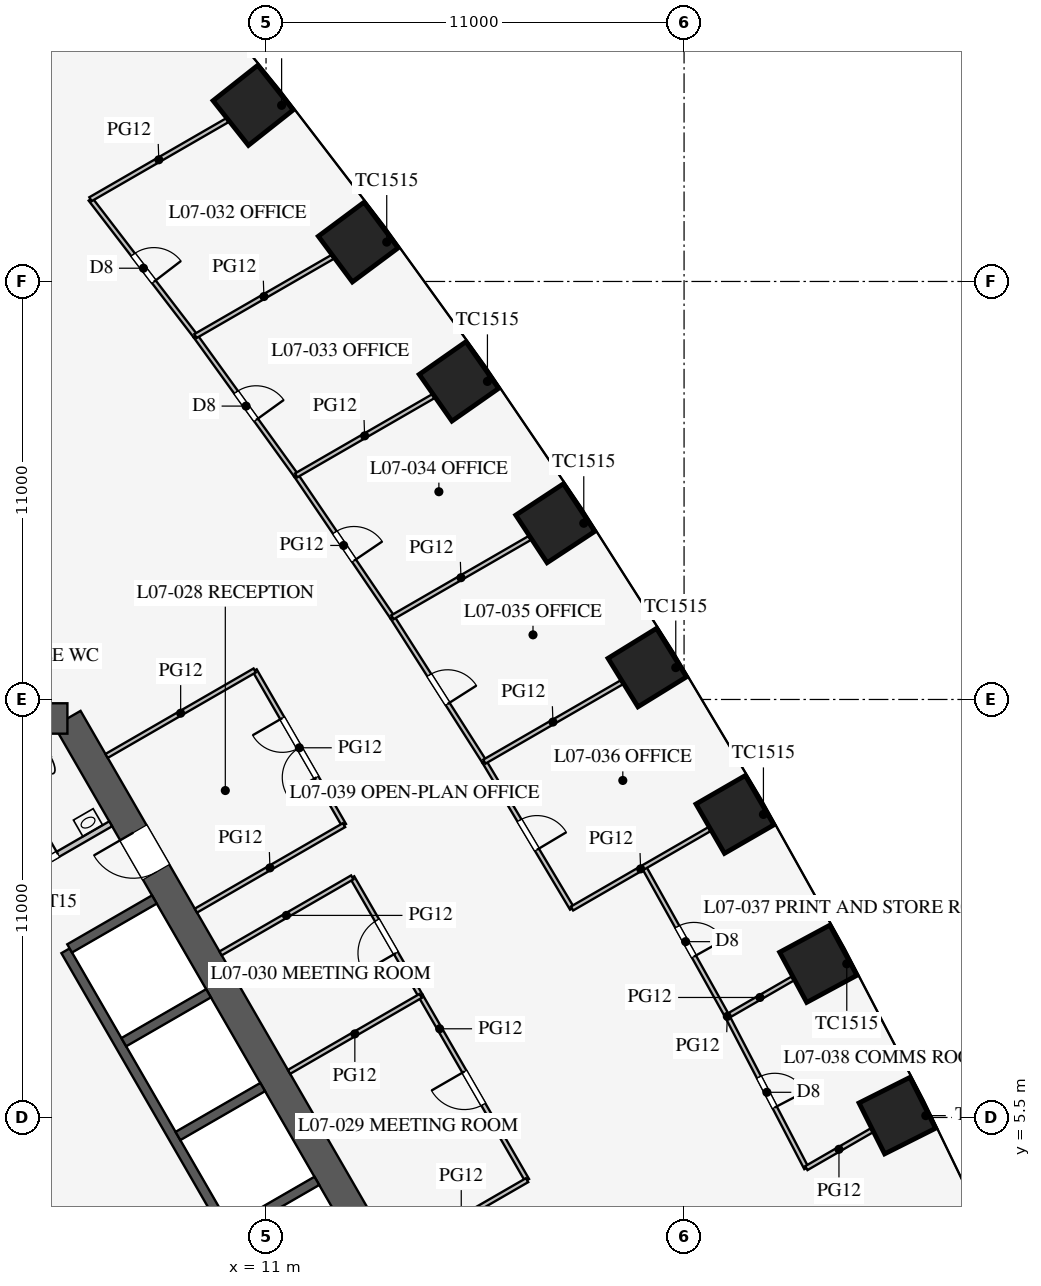
"""IFC4 building model, lengths in metres.
Left out: names, types, materials, properties, quantities, classifications, styles, units other than length and angle.
Written with IfcOpenShell. Run it as: python <this file> out.ifc"""

import sys

from ifc_helpers import new_model, si_unit, direction, frame, frame_2d, origin, origin_2d, place, context, subcontext, project, spatial, rectangle, extrude, element, fill, save


model = new_model("IFC4")
c1 = context("Model", 3, precision=1e-05, world=origin(), true_north=direction((0.0, 1.0)))
c2 = subcontext(c1, "Body", "Model", "MODEL_VIEW")
j1 = project(units=[si_unit("LENGTHUNIT", "METRE"), si_unit("PLANEANGLEUNIT", "RADIAN")], contexts=[c1])
p1 = place(None, origin())
s1 = spatial("IfcSite", under=j1, at=p1, CompositionType="ELEMENT")
p2 = place(p1, origin())
s2 = spatial("IfcBuilding", under=s1, at=p2, CompositionType="ELEMENT")
p3 = place(p2, frame((0.0, 0.0, 33.3)))
s3 = spatial("IfcBuildingStorey", under=s2, at=p3, CompositionType="ELEMENT", Elevation=33.3)
for number, where, z_axis, x_axis in (
    (1, (27.611, 5.549, 0.0), (0.0, 0.0, 1.0), (-0.449, 0.894, 0.0)),
    (2, (25.531, 9.544, 0.0), (0.0, 0.0, 1.0), (-0.475, 0.88, 0.0)),
    (3, (23.338, 13.474, 0.0), (0.0, 0.0, 1.0), (-0.5, 0.866, 0.0)),
    (4, (21.031, 17.339, 0.0), (0.0, 0.0, 1.0), (-0.525, 0.851, 0.0)),
    (5, (18.611, 21.137, 0.0), (0.0, 0.0, 1.0), (-0.549, 0.836, 0.0)),
    (6, (16.076, 24.87, 0.0), (0.0, 0.0, 1.0), (-0.574, 0.819, 0.0)),
    (7, (13.426, 28.536, 0.0), (0.0, 0.0, 1.0), (-0.597, 0.802, 0.0)),
    (8, (10.66, 32.135, 0.0), (0.0, 0.0, 1.0), (-0.62, 0.784, 0.0)),
):
    element("IfcColumn", number, at=place(p3, frame(where, z_axis=z_axis, x_axis=x_axis)), inside=s3, PredefinedType="COLUMN", context=c2, shape_type="SweptSolid", body=[
        extrude(rectangle(XDim=1.5, YDim=1.5, at=origin_2d()), origin(), (0.0, 0.0, 1.0), 4.2),
    ])
p4 = place(p3, frame((16.743, -3.0, 0.0), z_axis=(0.0, 0.0, 1.0), x_axis=(-0.500002442456, 0.866023993627, 0.0)))
e9 = element("IfcWall", 9, at=p4, inside=s3, PredefinedType="SHEAR", context=c2, shape_type="SweptSolid", body=[
    extrude(rectangle(XDim=21.939, YDim=0.8, at=frame_2d((10.97, 0.0))), origin(), (0.0, 0.0, 1.0), 4.2),
])
p5 = place(p4, frame((17.27, 0.0, 0.0)))
e10 = element("IfcOpeningElement", 10, at=p5, cuts=e9, PredefinedType="OPENING", context=c2, shape_type="SweptSolid", body=[
    extrude(rectangle(XDim=1.2, YDim=2.1, at=frame_2d((0.6, 1.05))), frame((0.0, 0.41, 0.0), z_axis=(0.0, -1.0, 0.0), x_axis=(1.0, 0.0, 0.0)), (0.0, 0.0, 1.0), 0.82),
])
p6 = place(p4, frame((3.47, 0.0, 0.0)))
e11 = element("IfcOpeningElement", 11, at=p6, cuts=e9, PredefinedType="OPENING", context=c2, shape_type="SweptSolid", body=[
    extrude(rectangle(XDim=1.2, YDim=2.1, at=frame_2d((0.6, 1.05))), frame((0.0, 0.41, 0.0), z_axis=(0.0, -1.0, 0.0), x_axis=(1.0, 0.0, 0.0)), (0.0, 0.0, 1.0), 0.82),
])
p7 = place(p3, frame((5.773, 16.0, 0.0), z_axis=(0.0, 0.0, 1.0), x_axis=(-1.0, 0.0, 0.0)))
e12 = element("IfcWall", 12, at=p7, inside=s3, PredefinedType="SHEAR", context=c2, shape_type="SweptSolid", body=[
    extrude(rectangle(XDim=11.547, YDim=0.8, at=frame_2d((5.773, 0.0))), origin(), (0.0, 0.0, 1.0), 4.2),
])
p8 = place(p3, frame((11.424, 0.014, 0.0), z_axis=(0.0, 0.0, 1.0), x_axis=(-0.500001763848, 0.866024385424, 0.0)))
e13 = element("IfcWall", 13, at=p8, inside=s3, PredefinedType="SHEAR", context=c2, shape_type="SweptSolid", body=[
    extrude(rectangle(XDim=11.4, YDim=0.25, at=frame_2d((5.7, 0.0))), origin(), (0.0, 0.0, 1.0), 4.2),
])
for number, where, z_axis, x_axis in (
    (14, (10.107, 2.544, 0.0), (0.0, 0.0, 1.0), (0.866, 0.5, 0.0)),
    (15, (8.682, 5.012, 0.0), (0.0, 0.0, 1.0), (0.866, 0.5, 0.0)),
    (16, (7.257, 7.481, 0.0), (0.0, 0.0, 1.0), (0.866, 0.5, 0.0)),
):
    element("IfcWall", number, at=place(p3, frame(where, z_axis=z_axis, x_axis=x_axis)), inside=s3, PredefinedType="SHEAR", context=c2, shape_type="SweptSolid", body=[
        extrude(rectangle(XDim=2.575, YDim=0.25, at=frame_2d((1.288, 0.0))), origin(), (0.0, 0.0, 1.0), 4.2),
    ])
p9 = place(p3, frame((5.832, 9.949, 0.0), z_axis=(0.0, 0.0, 1.0), x_axis=(0.866029291668, 0.499993265928, 0.0)))
e17 = element("IfcWall", 17, at=p9, inside=s3, PredefinedType="SHEAR", context=c2, shape_type="SweptSolid", body=[
    extrude(rectangle(XDim=2.575, YDim=0.25, at=frame_2d((1.288, 0.0))), origin(), (0.0, 0.0, 1.0), 4.2),
])
p10 = place(p3, frame((2.495, 10.678, 0.0), z_axis=(0.0, 0.0, 1.0), x_axis=(0.86602216432, 0.500005610874, 0.0)))
e18 = element("IfcWall", 18, at=p10, inside=s3, PredefinedType="PARTITIONING", context=c2, shape_type="SweptSolid", body=[
    extrude(rectangle(XDim=5.1, YDim=0.15, at=frame_2d((2.55, 0.0))), origin(), (0.0, 0.0, 1.0), 4.0),
])
p11 = place(p10, frame((2.6, 0.0, 0.0)))
e19 = element("IfcOpeningElement", 19, at=p11, cuts=e18, PredefinedType="OPENING", context=c2, shape_type="SweptSolid", body=[
    extrude(rectangle(XDim=0.9, YDim=2.1, at=frame_2d((0.45, 1.05))), frame((0.0, 0.085, 0.0), z_axis=(0.0, -1.0, 0.0), x_axis=(1.0, 0.0, 0.0)), (0.0, 0.0, 1.0), 0.17),
])
p12 = place(p3, frame((13.052, 13.194, 0.0), z_axis=(0.0, 0.0, 1.0), x_axis=(-0.499977259774, 0.866038532462, 0.0)))
e20 = element("IfcWall", 20, at=p12, inside=s3, PredefinedType="PARTITIONING", context=c2, shape_type="SweptSolid", body=[
    extrude(rectangle(XDim=4.7, YDim=0.12, at=frame_2d((2.35, 0.0))), origin(), (0.0, 0.0, 1.0), 2.9),
])
p13 = place(p12, frame((1.45, 0.0, 0.15)))
e21 = element("IfcOpeningElement", 21, at=p13, cuts=e20, PredefinedType="OPENING", context=c2, shape_type="SweptSolid", body=[
    extrude(rectangle(XDim=1.8, YDim=2.1, at=frame_2d((0.9, 1.05))), frame((0.0, 0.07, 0.0), z_axis=(0.0, -1.0, 0.0), x_axis=(1.0, 0.0, 0.0)), (0.0, 0.0, 1.0), 0.14),
])
p14 = place(p3, frame((15.069, 8.7, 0.0), z_axis=(0.0, 0.0, 1.0), x_axis=(-0.500012057535, 0.866018442252, 0.0)))
e22 = element("IfcWall", 22, at=p14, inside=s3, PredefinedType="PARTITIONING", context=c2, shape_type="SweptSolid", body=[
    extrude(rectangle(XDim=3.6, YDim=0.12, at=frame_2d((1.8, 0.0))), origin(), (0.0, 0.0, 1.0), 2.9),
])
p15 = place(p14, frame((1.3, 0.0, 0.15)))
e23 = element("IfcOpeningElement", 23, at=p15, cuts=e22, PredefinedType="OPENING", context=c2, shape_type="SweptSolid", body=[
    extrude(rectangle(XDim=1.0, YDim=2.1, at=frame_2d((0.5, 1.05))), frame((0.0, 0.07, 0.0), z_axis=(0.0, -1.0, 0.0), x_axis=(1.0, 0.0, 0.0)), (0.0, 0.0, 1.0), 0.14),
])
p16 = place(p3, frame((17.869, 3.85, 0.0), z_axis=(0.0, 0.0, 1.0), x_axis=(-0.500016814911, 0.866015695474, 0.0)))
e24 = element("IfcWall", 24, at=p16, inside=s3, PredefinedType="PARTITIONING", context=c2, shape_type="SweptSolid", body=[
    extrude(rectangle(XDim=5.6, YDim=0.12, at=frame_2d((2.8, 0.0))), origin(), (0.0, 0.0, 1.0), 2.9),
])
p17 = place(p16, frame((2.3, 0.0, 0.15)))
e25 = element("IfcOpeningElement", 25, at=p17, cuts=e24, PredefinedType="OPENING", context=c2, shape_type="SweptSolid", body=[
    extrude(rectangle(XDim=1.0, YDim=2.1, at=frame_2d((0.5, 1.05))), frame((0.0, 0.07, 0.0), z_axis=(0.0, -1.0, 0.0), x_axis=(1.0, 0.0, 0.0)), (0.0, 0.0, 1.0), 0.14),
])
p18 = place(p3, frame((9.805, 9.818, 0.0), z_axis=(0.0, 0.0, 1.0), x_axis=(0.866026010844, 0.49999894854, 0.0)))
e26 = element("IfcWall", 26, at=p18, inside=s3, PredefinedType="PARTITIONING", context=c2, shape_type="SweptSolid", body=[
    extrude(rectangle(XDim=4.0, YDim=0.12, at=frame_2d((2.0, 0.0))), origin(), (0.0, 0.0, 1.0), 2.9),
])
p19 = place(p3, frame((9.155, 10.944, 0.0), z_axis=(0.0, 0.0, 1.0), x_axis=(0.866017533419, 0.500013631625, 0.0)))
e27 = element("IfcWall", 27, at=p19, inside=s3, PredefinedType="PARTITIONING", context=c2, shape_type="SweptSolid", body=[
    extrude(rectangle(XDim=4.5, YDim=0.12, at=frame_2d((2.25, 0.0))), origin(), (0.0, 0.0, 1.0), 2.9),
])
p20 = place(p3, frame((6.805, 15.014, 0.0), z_axis=(0.0, 0.0, 1.0), x_axis=(0.866031096941, 0.499990139034, 0.0)))
e28 = element("IfcWall", 28, at=p20, inside=s3, PredefinedType="PARTITIONING", context=c2, shape_type="SweptSolid", body=[
    extrude(rectangle(XDim=4.5, YDim=0.12, at=frame_2d((2.25, 0.0))), origin(), (0.0, 0.0, 1.0), 2.9),
])
for number, where, z_axis, x_axis in (
    (29, (11.605, 6.7, 0.0), (0.0, 0.0, 1.0), (0.866, 0.5, 0.0)),
    (30, (14.405, 1.85, 0.0), (0.0, 0.0, 1.0), (0.866, 0.5, 0.0)),
):
    element("IfcWall", number, at=place(p3, frame(where, z_axis=z_axis, x_axis=x_axis)), inside=s3, PredefinedType="PARTITIONING", context=c2, shape_type="SweptSolid", body=[
        extrude(rectangle(XDim=4.0, YDim=0.12, at=frame_2d((2.0, 0.0))), origin(), (0.0, 0.0, 1.0), 2.9),
    ])
p21 = place(p3, frame((19.052, 10.999, 0.0), z_axis=(0.0, 0.0, 1.0), x_axis=(-0.51252396108, 0.858672923364, 0.0)))
e31 = element("IfcWall", 31, at=p21, inside=s3, PredefinedType="PARTITIONING", context=c2, shape_type="SweptSolid", body=[
    extrude(rectangle(XDim=4.5, YDim=0.12, at=frame_2d((2.25, 0.0))), origin(), (0.0, 0.0, 1.0), 2.9),
])
p22 = place(p21, frame((1.8, 0.0, 0.15)))
e32 = element("IfcOpeningElement", 32, at=p22, cuts=e31, PredefinedType="OPENING", context=c2, shape_type="SweptSolid", body=[
    extrude(rectangle(XDim=0.9, YDim=2.1, at=frame_2d((0.45, 1.05))), frame((0.0, 0.07, 0.0), z_axis=(0.0, -1.0, 0.0), x_axis=(1.0, 0.0, 0.0)), (0.0, 0.0, 1.0), 0.14),
])
p23 = place(p3, frame((11.792, 22.396, 0.0), z_axis=(0.0, 0.0, 1.0), x_axis=(-0.585376255171, 0.810761765183, 0.0)))
e33 = element("IfcWall", 33, at=p23, inside=s3, PredefinedType="PARTITIONING", context=c2, shape_type="SweptSolid", body=[
    extrude(rectangle(XDim=4.523, YDim=0.12, at=frame_2d((2.262, 0.0))), origin(), (0.0, 0.0, 1.0), 2.9),
])
p24 = place(p23, frame((1.8, 0.0, 0.15)))
e34 = element("IfcOpeningElement", 34, at=p24, cuts=e33, PredefinedType="OPENING", context=c2, shape_type="SweptSolid", body=[
    extrude(rectangle(XDim=0.9, YDim=2.1, at=frame_2d((0.45, 1.05))), frame((0.0, 0.07, 0.0), z_axis=(0.0, -1.0, 0.0), x_axis=(1.0, 0.0, 0.0)), (0.0, 0.0, 1.0), 0.14),
])
p25 = place(p3, frame((9.144, 26.064, 0.0), z_axis=(0.0, 0.0, 1.0), x_axis=(-0.608818785139, 0.79330932609, 0.0)))
e35 = element("IfcWall", 35, at=p25, inside=s3, PredefinedType="PARTITIONING", context=c2, shape_type="SweptSolid", body=[
    extrude(rectangle(XDim=4.539, YDim=0.12, at=frame_2d((2.27, 0.0))), origin(), (0.0, 0.0, 1.0), 2.9),
])
p26 = place(p25, frame((1.8, 0.0, 0.15)))
e36 = element("IfcOpeningElement", 36, at=p26, cuts=e35, PredefinedType="OPENING", context=c2, shape_type="SweptSolid", body=[
    extrude(rectangle(XDim=0.9, YDim=2.1, at=frame_2d((0.45, 1.05))), frame((0.0, 0.07, 0.0), z_axis=(0.0, -1.0, 0.0), x_axis=(1.0, 0.0, 0.0)), (0.0, 0.0, 1.0), 0.14),
])
p27 = place(p3, frame((16.745, 14.864, 0.0), z_axis=(0.0, 0.0, 1.0), x_axis=(-0.537205132487, 0.843451626135, 0.0)))
e37 = element("IfcWall", 37, at=p27, inside=s3, PredefinedType="PARTITIONING", context=c2, shape_type="SweptSolid", body=[
    extrude(rectangle(XDim=4.504, YDim=0.12, at=frame_2d((2.252, 0.0))), origin(), (0.0, 0.0, 1.0), 2.9),
])
p28 = place(p27, frame((1.8, 0.0, 0.15)))
e38 = element("IfcOpeningElement", 38, at=p28, cuts=e37, PredefinedType="OPENING", context=c2, shape_type="SweptSolid", body=[
    extrude(rectangle(XDim=0.9, YDim=2.1, at=frame_2d((0.45, 1.05))), frame((0.0, 0.07, 0.0), z_axis=(0.0, -1.0, 0.0), x_axis=(1.0, 0.0, 0.0)), (0.0, 0.0, 1.0), 0.14),
])
p29 = place(p3, frame((14.325, 18.663, 0.0), z_axis=(0.0, 0.0, 1.0), x_axis=(-0.561512004239, 0.827468591002, 0.0)))
e39 = element("IfcWall", 39, at=p29, inside=s3, PredefinedType="PARTITIONING", context=c2, shape_type="SweptSolid", body=[
    extrude(rectangle(XDim=4.512, YDim=0.12, at=frame_2d((2.256, 0.0))), origin(), (0.0, 0.0, 1.0), 2.9),
])
p30 = place(p29, frame((1.8, 0.0, 0.15)))
e40 = element("IfcOpeningElement", 40, at=p30, cuts=e39, PredefinedType="OPENING", context=c2, shape_type="SweptSolid", body=[
    extrude(rectangle(XDim=0.9, YDim=2.1, at=frame_2d((0.45, 1.05))), frame((0.0, 0.07, 0.0), z_axis=(0.0, -1.0, 0.0), x_axis=(1.0, 0.0, 0.0)), (0.0, 0.0, 1.0), 0.14),
])
p31 = place(p3, frame((23.137, 8.162, 0.0), z_axis=(0.0, 0.0, 1.0), x_axis=(-0.487415216275, 0.87317031955, 0.0)))
e41 = element("IfcWall", 41, at=p31, inside=s3, PredefinedType="PARTITIONING", context=c2, shape_type="SweptSolid", body=[
    extrude(rectangle(XDim=4.5, YDim=0.12, at=frame_2d((2.25, 0.0))), origin(), (0.0, 0.0, 1.0), 2.9),
])
p32 = place(p31, frame((1.8, 0.0, 0.15)))
e42 = element("IfcOpeningElement", 42, at=p32, cuts=e41, PredefinedType="OPENING", context=c2, shape_type="SweptSolid", body=[
    extrude(rectangle(XDim=0.9, YDim=2.1, at=frame_2d((0.45, 1.05))), frame((0.0, 0.07, 0.0), z_axis=(0.0, -1.0, 0.0), x_axis=(1.0, 0.0, 0.0)), (0.0, 0.0, 1.0), 0.14),
])
p33 = place(p3, frame((25.217, 4.167, 0.0), z_axis=(0.0, 0.0, 1.0), x_axis=(-0.461810056307, 0.886978845235, 0.0)))
e43 = element("IfcWall", 43, at=p33, inside=s3, PredefinedType="PARTITIONING", context=c2, shape_type="SweptSolid", body=[
    extrude(rectangle(XDim=4.504, YDim=0.12, at=frame_2d((2.252, 0.0))), origin(), (0.0, 0.0, 1.0), 2.9),
])
p34 = place(p33, frame((1.8, 0.0, 0.15)))
e44 = element("IfcOpeningElement", 44, at=p34, cuts=e43, PredefinedType="OPENING", context=c2, shape_type="SweptSolid", body=[
    extrude(rectangle(XDim=0.9, YDim=2.1, at=frame_2d((0.45, 1.05))), frame((0.0, 0.07, 0.0), z_axis=(0.0, -1.0, 0.0), x_axis=(1.0, 0.0, 0.0)), (0.0, 0.0, 1.0), 0.14),
])
p35 = place(p3, frame((19.052, 10.999, 0.0), z_axis=(0.0, 0.0, 1.0), x_axis=(0.866004239599, 0.500036655653, 0.0)))
e45 = element("IfcWall", 45, at=p35, inside=s3, PredefinedType="PARTITIONING", context=c2, shape_type="SweptSolid", body=[
    extrude(rectangle(XDim=4.17, YDim=0.12, at=frame_2d((2.085, 0.0))), origin(), (0.0, 0.0, 1.0), 2.9),
])
p36 = place(p3, frame((11.792, 22.396, 0.0), z_axis=(0.0, 0.0, 1.0), x_axis=(0.866011781705, 0.500023593391, 0.0)))
e46 = element("IfcWall", 46, at=p36, inside=s3, PredefinedType="PARTITIONING", context=c2, shape_type="SweptSolid", body=[
    extrude(rectangle(XDim=4.164, YDim=0.12, at=frame_2d((2.082, 0.0))), origin(), (0.0, 0.0, 1.0), 2.9),
])
p37 = place(p3, frame((9.144, 26.064, 0.0), z_axis=(0.0, 0.0, 1.0), x_axis=(0.866031144707, 0.499990056298, 0.0)))
e47 = element("IfcWall", 47, at=p37, inside=s3, PredefinedType="PARTITIONING", context=c2, shape_type="SweptSolid", body=[
    extrude(rectangle(XDim=4.159, YDim=0.12, at=frame_2d((2.08, 0.0))), origin(), (0.0, 0.0, 1.0), 2.9),
])
p38 = place(p3, frame((6.38, 29.665, 0.0), z_axis=(0.0, 0.0, 1.0), x_axis=(0.866027987673, 0.499995524547, 0.0)))
e48 = element("IfcWall", 48, at=p38, inside=s3, PredefinedType="PARTITIONING", context=c2, shape_type="SweptSolid", body=[
    extrude(rectangle(XDim=4.153, YDim=0.12, at=frame_2d((2.077, 0.0))), origin(), (0.0, 0.0, 1.0), 2.9),
])
p39 = place(p3, frame((16.745, 14.864, 0.0), z_axis=(0.0, 0.0, 1.0), x_axis=(0.866025669538, 0.499999539701, 0.0)))
e49 = element("IfcWall", 49, at=p39, inside=s3, PredefinedType="PARTITIONING", context=c2, shape_type="SweptSolid", body=[
    extrude(rectangle(XDim=4.169, YDim=0.12, at=frame_2d((2.085, 0.0))), origin(), (0.0, 0.0, 1.0), 2.9),
])
p40 = place(p3, frame((14.325, 18.663, 0.0), z_axis=(0.0, 0.0, 1.0), x_axis=(0.866009971343, 0.50002672882, 0.0)))
e50 = element("IfcWall", 50, at=p40, inside=s3, PredefinedType="PARTITIONING", context=c2, shape_type="SweptSolid", body=[
    extrude(rectangle(XDim=4.167, YDim=0.12, at=frame_2d((2.083, 0.0))), origin(), (0.0, 0.0, 1.0), 2.9),
])
p41 = place(p3, frame((23.137, 8.162, 0.0), z_axis=(0.0, 0.0, 1.0), x_axis=(0.866023728021, 0.500002902497, 0.0)))
e51 = element("IfcWall", 51, at=p41, inside=s3, PredefinedType="PARTITIONING", context=c2, shape_type="SweptSolid", body=[
    extrude(rectangle(XDim=1.984, YDim=0.12, at=frame_2d((0.992, 0.0))), origin(), (0.0, 0.0, 1.0), 2.9),
])
p42 = place(p3, frame((25.217, 4.167, 0.0), z_axis=(0.0, 0.0, 1.0), x_axis=(0.866021515814, 0.500006734102, 0.0)))
e52 = element("IfcWall", 52, at=p42, inside=s3, PredefinedType="PARTITIONING", context=c2, shape_type="SweptSolid", body=[
    extrude(rectangle(XDim=1.982, YDim=0.12, at=frame_2d((0.991, 0.0))), origin(), (0.0, 0.0, 1.0), 2.9),
])
p43 = place(p11, origin())
e53 = element("IfcDoor", 53, at=p43, inside=s3, OperationType="SINGLE_SWING_RIGHT", PredefinedType="DOOR", context=c2, shape_type="SweptSolid", body=[
    extrude(rectangle(XDim=0.9, YDim=2.1, at=frame_2d((0.45, 1.05))), frame((0.0, 0.025, 0.0), z_axis=(0.0, -1.0, 0.0), x_axis=(1.0, 0.0, 0.0)), (0.0, 0.0, 1.0), 0.05),
])
fill(e19, e53)
p44 = place(p5, origin())
e54 = element("IfcDoor", 54, at=p44, inside=s3, OperationType="SINGLE_SWING_RIGHT", PredefinedType="DOOR", context=c2, shape_type="SweptSolid", body=[
    extrude(rectangle(XDim=1.2, YDim=2.1, at=frame_2d((0.6, 1.05))), frame((0.0, 0.025, 0.0), z_axis=(0.0, -1.0, 0.0), x_axis=(1.0, 0.0, 0.0)), (0.0, 0.0, 1.0), 0.05),
])
fill(e10, e54)
p45 = place(p13, origin())
e55 = element("IfcDoor", 55, at=p45, inside=s3, OperationType="DOUBLE_DOOR_SINGLE_SWING", PredefinedType="DOOR", context=c2, shape_type="SweptSolid", body=[
    extrude(rectangle(XDim=1.8, YDim=2.1, at=frame_2d((0.9, 1.05))), frame((0.0, 0.025, 0.0), z_axis=(0.0, -1.0, 0.0), x_axis=(1.0, 0.0, 0.0)), (0.0, 0.0, 1.0), 0.05),
])
fill(e21, e55)
p46 = place(p17, origin())
e56 = element("IfcDoor", 56, at=p46, inside=s3, OperationType="SINGLE_SWING_RIGHT", PredefinedType="DOOR", context=c2, shape_type="SweptSolid", body=[
    extrude(rectangle(XDim=1.0, YDim=2.1, at=frame_2d((0.5, 1.05))), frame((0.0, 0.025, 0.0), z_axis=(0.0, -1.0, 0.0), x_axis=(1.0, 0.0, 0.0)), (0.0, 0.0, 1.0), 0.05),
])
fill(e25, e56)
p47 = place(p15, origin())
e57 = element("IfcDoor", 57, at=p47, inside=s3, OperationType="SINGLE_SWING_LEFT", PredefinedType="DOOR", context=c2, shape_type="SweptSolid", body=[
    extrude(rectangle(XDim=1.0, YDim=2.1, at=frame_2d((0.5, 1.05))), frame((0.0, 0.025, 0.0), z_axis=(0.0, -1.0, 0.0), x_axis=(1.0, 0.0, 0.0)), (0.0, 0.0, 1.0), 0.05),
])
fill(e23, e57)
p48 = place(p26, frame((0.9, 0.0, 0.0), z_axis=(0.0, 0.0, 1.0), x_axis=(-1.0, 0.0, 0.0)))
e58 = element("IfcDoor", 58, at=p48, inside=s3, OperationType="SINGLE_SWING_RIGHT", PredefinedType="DOOR", context=c2, shape_type="SweptSolid", body=[
    extrude(rectangle(XDim=0.9, YDim=2.1, at=frame_2d((0.45, 1.05))), frame((0.0, 0.025, 0.0), z_axis=(0.0, -1.0, 0.0), x_axis=(1.0, 0.0, 0.0)), (0.0, 0.0, 1.0), 0.05),
])
fill(e36, e58)
p49 = place(p24, frame((0.9, 0.0, 0.0), z_axis=(0.0, 0.0, 1.0), x_axis=(-1.0, 0.0, 0.0)))
e59 = element("IfcDoor", 59, at=p49, inside=s3, OperationType="SINGLE_SWING_RIGHT", PredefinedType="DOOR", context=c2, shape_type="SweptSolid", body=[
    extrude(rectangle(XDim=0.9, YDim=2.1, at=frame_2d((0.45, 1.05))), frame((0.0, 0.025, 0.0), z_axis=(0.0, -1.0, 0.0), x_axis=(1.0, 0.0, 0.0)), (0.0, 0.0, 1.0), 0.05),
])
fill(e34, e59)
p50 = place(p30, frame((0.9, 0.0, 0.0), z_axis=(0.0, 0.0, 1.0), x_axis=(-1.0, 0.0, 0.0)))
e60 = element("IfcDoor", 60, at=p50, inside=s3, OperationType="SINGLE_SWING_RIGHT", PredefinedType="DOOR", context=c2, shape_type="SweptSolid", body=[
    extrude(rectangle(XDim=0.9, YDim=2.1, at=frame_2d((0.45, 1.05))), frame((0.0, 0.025, 0.0), z_axis=(0.0, -1.0, 0.0), x_axis=(1.0, 0.0, 0.0)), (0.0, 0.0, 1.0), 0.05),
])
fill(e40, e60)
p51 = place(p28, frame((0.9, 0.0, 0.0), z_axis=(0.0, 0.0, 1.0), x_axis=(-1.0, 0.0, 0.0)))
e61 = element("IfcDoor", 61, at=p51, inside=s3, OperationType="SINGLE_SWING_RIGHT", PredefinedType="DOOR", context=c2, shape_type="SweptSolid", body=[
    extrude(rectangle(XDim=0.9, YDim=2.1, at=frame_2d((0.45, 1.05))), frame((0.0, 0.025, 0.0), z_axis=(0.0, -1.0, 0.0), x_axis=(1.0, 0.0, 0.0)), (0.0, 0.0, 1.0), 0.05),
])
fill(e38, e61)
p52 = place(p22, frame((0.9, 0.0, 0.0), z_axis=(0.0, 0.0, 1.0), x_axis=(-1.0, 0.0, 0.0)))
e62 = element("IfcDoor", 62, at=p52, inside=s3, OperationType="SINGLE_SWING_RIGHT", PredefinedType="DOOR", context=c2, shape_type="SweptSolid", body=[
    extrude(rectangle(XDim=0.9, YDim=2.1, at=frame_2d((0.45, 1.05))), frame((0.0, 0.025, 0.0), z_axis=(0.0, -1.0, 0.0), x_axis=(1.0, 0.0, 0.0)), (0.0, 0.0, 1.0), 0.05),
])
fill(e32, e62)
p53 = place(p32, frame((0.9, 0.0, 0.0), z_axis=(0.0, 0.0, 1.0), x_axis=(-1.0, 0.0, 0.0)))
e63 = element("IfcDoor", 63, at=p53, inside=s3, OperationType="SINGLE_SWING_RIGHT", PredefinedType="DOOR", context=c2, shape_type="SweptSolid", body=[
    extrude(rectangle(XDim=0.9, YDim=2.1, at=frame_2d((0.45, 1.05))), frame((0.0, 0.025, 0.0), z_axis=(0.0, -1.0, 0.0), x_axis=(1.0, 0.0, 0.0)), (0.0, 0.0, 1.0), 0.05),
])
fill(e42, e63)
p54 = place(p34, frame((0.9, 0.0, 0.0), z_axis=(0.0, 0.0, 1.0), x_axis=(-1.0, 0.0, 0.0)))
e64 = element("IfcDoor", 64, at=p54, inside=s3, OperationType="SINGLE_SWING_RIGHT", PredefinedType="DOOR", context=c2, shape_type="SweptSolid", body=[
    extrude(rectangle(XDim=0.9, YDim=2.1, at=frame_2d((0.45, 1.05))), frame((0.0, 0.025, 0.0), z_axis=(0.0, -1.0, 0.0), x_axis=(1.0, 0.0, 0.0)), (0.0, 0.0, 1.0), 0.05),
])
fill(e44, e64)
save(model, sys.argv[1])
